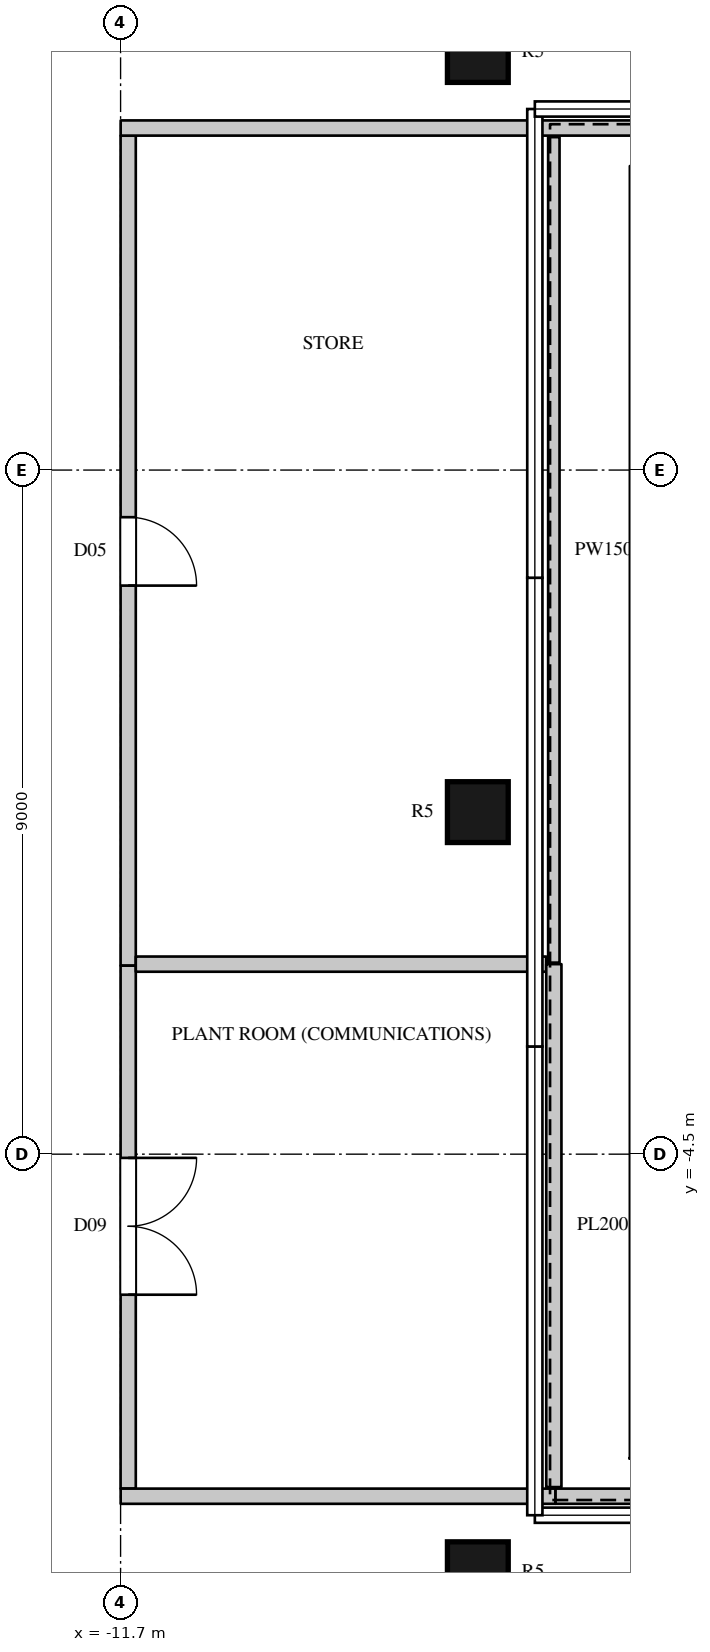
"""IFC4 building model, lengths in metres.
Left out: names, types, materials, properties, quantities, classifications, styles, units other than length and angle.
Written with IfcOpenShell. Run it as: python <this file> out.ifc"""

import sys

from ifc_helpers import new_model, si_unit, direction, frame, frame_2d, origin, origin_2d, place, context, subcontext, project, spatial, rectangle, circle, extrude, element, fill, save


model = new_model("IFC4")
c1 = context("Model", 3, precision=1e-05, world=origin(), true_north=direction((0.0, 1.0)))
c2 = subcontext(c1, "Body", "Model", "MODEL_VIEW")
j1 = project(units=[si_unit("LENGTHUNIT", "METRE"), si_unit("PLANEANGLEUNIT", "RADIAN")], contexts=[c1])
p1 = place(None, origin())
s1 = spatial("IfcSite", under=j1, at=p1, CompositionType="ELEMENT")
p2 = place(p1, origin())
s2 = spatial("IfcBuilding", under=s1, at=p2, CompositionType="ELEMENT")
p3 = place(p2, frame((0.0, 0.0, 355.0)))
s3 = spatial("IfcBuildingStorey", under=s2, at=p3, CompositionType="ELEMENT", Elevation=355.0)
for number, where, z_axis, x_axis in (
    (1, (-7.0, -10.0, 0.0), (0.0, 0.0, 1.0), (1.0, 0.0, 0.0)),
    (2, (-7.0, 0.0, 0.0), (0.0, 0.0, 1.0), (1.0, 0.0, 0.0)),
    (3, (-7.0, 10.0, 0.0), (0.0, 0.0, 1.0), (1.0, 0.0, 0.0)),
):
    element("IfcColumn", number, at=place(p3, frame(where, z_axis=z_axis, x_axis=x_axis)), inside=s3, PredefinedType="COLUMN", context=c2, shape_type="SweptSolid", body=[
        extrude(circle(Radius=0.4, at=origin_2d()), origin(), (0.0, 0.0, 1.0), 4.0),
    ])
p4 = place(p3, frame((-11.6, -2.02, 0.0), z_axis=(0.0, 0.0, 1.0), x_axis=(0.0, 1.0, 0.0)))
e4 = element("IfcWall", 4, at=p4, inside=s3, PredefinedType="PARTITIONING", context=c2, shape_type="SweptSolid", body=[
    extrude(rectangle(XDim=10.919, YDim=0.2, at=frame_2d((5.459, 0.0))), origin(), (0.0, 0.0, 1.0), 3.548),
])
p5 = place(p4, frame((5.0, 0.0, 0.0)))
e5 = element("IfcOpeningElement", 5, at=p5, cuts=e4, PredefinedType="OPENING", context=c2, shape_type="SweptSolid", body=[
    extrude(rectangle(XDim=0.9, YDim=2.2, at=frame_2d((0.45, 1.1))), frame((0.0, 0.11, 0.0), z_axis=(0.0, -1.0, 0.0), x_axis=(1.0, 0.0, 0.0)), (0.0, 0.0, 1.0), 0.22),
])
p6 = place(p3, frame((-11.699, 9.0, 0.0), z_axis=(0.0, 0.0, 1.0), x_axis=(1.0, 0.0, 0.0)))
e6 = element("IfcWall", 6, at=p6, inside=s3, PredefinedType="PARTITIONING", context=c2, shape_type="SweptSolid", body=[
    extrude(rectangle(XDim=19.679, YDim=0.2, at=frame_2d((9.839, 0.0))), origin(), (0.0, 0.0, 1.0), 3.548),
])
p7 = place(p3, frame((-5.98, -9.0, 0.0), z_axis=(0.0, 0.0, 1.0), x_axis=(1.0, 0.0, 0.0)))
e7 = element("IfcWall", 7, at=p7, inside=s3, PredefinedType="PARTITIONING", context=c2, shape_type="SweptSolid", body=[
    extrude(rectangle(XDim=13.96, YDim=0.2, at=frame_2d((6.98, 0.0))), origin(), (0.0, 0.0, 1.0), 3.548),
])
p8 = place(p3, frame((-6.0, -1.98, 0.0), z_axis=(0.0, 0.0, 1.0), x_axis=(0.0, 1.0, 0.0)))
e8 = element("IfcWall", 8, at=p8, inside=s3, PredefinedType="PARTITIONING", context=c2, shape_type="SweptSolid", body=[
    extrude(rectangle(XDim=10.86, YDim=0.15, at=frame_2d((5.43, 0.0))), origin(), (0.0, 0.0, 1.0), 3.548),
])
p9 = place(p3, frame((-11.6, -8.899, 0.0), z_axis=(0.0, 0.0, 1.0), x_axis=(0.0, 1.0, 0.0)))
e9 = element("IfcWall", 9, at=p9, inside=s3, PredefinedType="PARTITIONING", context=c2, shape_type="SweptSolid", body=[
    extrude(rectangle(XDim=6.879, YDim=0.2, at=frame_2d((3.439, 0.0))), origin(), (0.0, 0.0, 1.0), 3.548),
])
p10 = place(p9, frame((2.55, 0.0, 0.0)))
e10 = element("IfcOpeningElement", 10, at=p10, cuts=e9, PredefinedType="OPENING", context=c2, shape_type="SweptSolid", body=[
    extrude(rectangle(XDim=1.8, YDim=2.4, at=frame_2d((0.9, 1.2))), frame((0.0, 0.11, 0.0), z_axis=(0.0, -1.0, 0.0), x_axis=(1.0, 0.0, 0.0)), (0.0, 0.0, 1.0), 0.22),
])
p11 = place(p3, frame((-11.5, -2.0, 0.0), z_axis=(0.0, 0.0, 1.0), x_axis=(1.0, 0.0, 0.0)))
e11 = element("IfcWall", 11, at=p11, inside=s3, PredefinedType="PARTITIONING", context=c2, shape_type="SweptSolid", body=[
    extrude(rectangle(XDim=5.4, YDim=0.2, at=frame_2d((2.7, 0.0))), origin(), (0.0, 0.0, 1.0), 3.548),
])
p12 = place(p3, frame((-11.699, -9.0, 0.0), z_axis=(0.0, 0.0, 1.0), x_axis=(1.0, 0.0, 0.0)))
e12 = element("IfcWall", 12, at=p12, inside=s3, PredefinedType="PARTITIONING", context=c2, shape_type="SweptSolid", body=[
    extrude(rectangle(XDim=5.719, YDim=0.2, at=frame_2d((2.859, 0.0))), origin(), (0.0, 0.0, 1.0), 3.548),
])
p13 = place(p3, frame((-6.0, -8.88, 0.0), z_axis=(0.0, 0.0, 1.0), x_axis=(0.0, 1.0, 0.0)))
e13 = element("IfcWall", 13, at=p13, inside=s3, PredefinedType="PARTITIONING", context=c2, shape_type="SweptSolid", body=[
    extrude(rectangle(XDim=6.88, YDim=0.2, at=frame_2d((3.44, 0.0))), origin(), (0.0, 0.0, 1.0), 3.548),
])
p14 = place(p10, origin())
e14 = element("IfcDoor", 14, at=p14, inside=s3, OperationType="DOUBLE_DOOR_SINGLE_SWING", PredefinedType="DOOR", context=c2, shape_type="SweptSolid", body=[
    extrude(rectangle(XDim=1.8, YDim=2.4, at=frame_2d((0.9, 1.2))), frame((0.0, 0.025, 0.0), z_axis=(0.0, -1.0, 0.0), x_axis=(1.0, 0.0, 0.0)), (0.0, 0.0, 1.0), 0.05),
])
fill(e10, e14)
p15 = place(p5, origin())
e15 = element("IfcDoor", 15, at=p15, inside=s3, OperationType="SINGLE_SWING_RIGHT", PredefinedType="DOOR", context=c2, shape_type="SweptSolid", body=[
    extrude(rectangle(XDim=0.9, YDim=2.2, at=frame_2d((0.45, 1.1))), frame((0.0, 0.025, 0.0), z_axis=(0.0, -1.0, 0.0), x_axis=(1.0, 0.0, 0.0)), (0.0, 0.0, 1.0), 0.05),
])
fill(e5, e15)
save(model, sys.argv[1])
